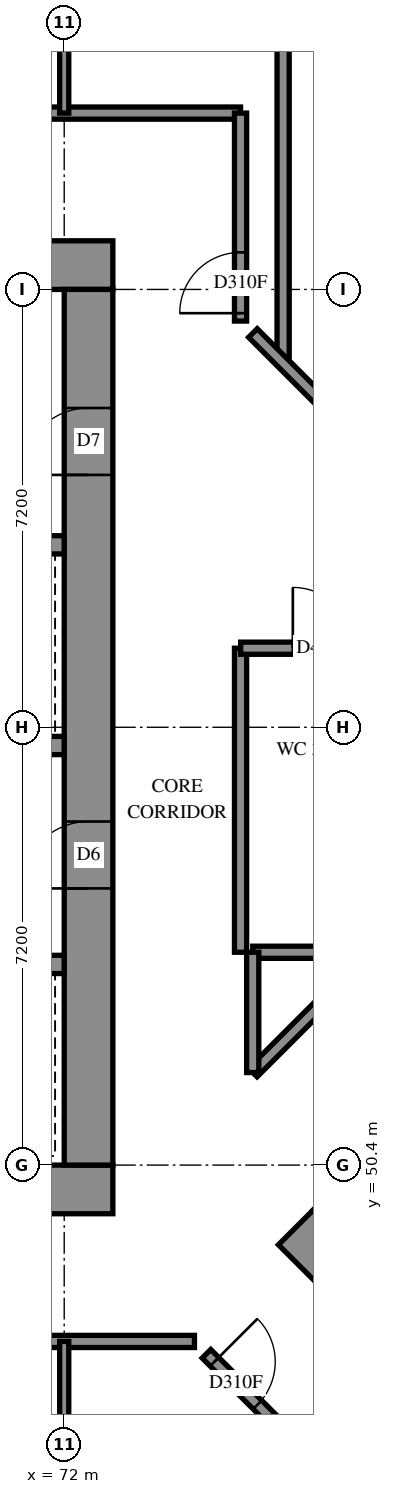
"""IFC4 building model, lengths in metres.
Left out: names, types, materials, properties, quantities, classifications, styles, units other than length and angle.
Written with IfcOpenShell. Run it as: python <this file> out.ifc"""

import sys

from ifc_helpers import new_model, si_unit, direction, frame, frame_2d, origin, place, context, subcontext, project, spatial, rectangle, extrude, element, fill, save


model = new_model("IFC4")
c1 = context("Model", 3, precision=1e-05, world=origin(), true_north=direction((0.0, 1.0)))
c2 = subcontext(c1, "Body", "Model", "MODEL_VIEW")
j1 = project(units=[si_unit("LENGTHUNIT", "METRE"), si_unit("PLANEANGLEUNIT", "RADIAN")], contexts=[c1])
p1 = place(None, origin())
s1 = spatial("IfcSite", under=j1, at=p1, CompositionType="ELEMENT")
p2 = place(p1, origin())
s2 = spatial("IfcBuilding", under=s1, at=p2, CompositionType="ELEMENT")
p3 = place(p2, frame((0.0, 0.0, 115.2)))
s3 = spatial("IfcBuildingStorey", under=s2, at=p3, CompositionType="ELEMENT", Elevation=115.2)
p4 = place(p3, frame((56.8, 50.0, -0.3), z_axis=(0.0, 0.0, 1.0), x_axis=(1.0, 0.0, 0.0)))
e1 = element("IfcWall", 1, at=p4, inside=s3, PredefinedType="SHEAR", context=c2, shape_type="SweptSolid", body=[
    extrude(rectangle(XDim=16.0, YDim=0.8, at=frame_2d((8.0, 0.0))), origin(), (0.0, 0.0, 1.0), 2.7),
])
p5 = place(p3, frame((56.8, 65.2, -0.3), z_axis=(0.0, 0.0, 1.0), x_axis=(1.0, 0.0, 0.0)))
e2 = element("IfcWall", 2, at=p5, inside=s3, PredefinedType="SHEAR", context=c2, shape_type="SweptSolid", body=[
    extrude(rectangle(XDim=16.0, YDim=0.8, at=frame_2d((8.0, 0.0))), origin(), (0.0, 0.0, 1.0), 2.7),
])
p6 = place(p5, frame((10.8, 0.0, 0.3)))
e3 = element("IfcOpeningElement", 3, at=p6, cuts=e2, PredefinedType="OPENING", context=c2, shape_type="SweptSolid", body=[
    extrude(rectangle(XDim=0.8, YDim=2.1, at=frame_2d((0.4, 1.05))), frame((0.0, 0.41, 0.0), z_axis=(0.0, -1.0, 0.0), x_axis=(1.0, 0.0, 0.0)), (0.0, 0.0, 1.0), 0.82),
])
p7 = place(p3, frame((72.4, 50.4, -0.3), z_axis=(0.0, 0.0, 1.0), x_axis=(0.0, 1.0, 0.0)))
e4 = element("IfcWall", 4, at=p7, inside=s3, PredefinedType="SHEAR", context=c2, shape_type="SweptSolid", body=[
    extrude(rectangle(XDim=14.4, YDim=0.8, at=frame_2d((7.2, 0.0))), origin(), (0.0, 0.0, 1.0), 2.7),
])
p8 = place(p7, frame((4.55, 0.0, 0.3)))
e5 = element("IfcOpeningElement", 5, at=p8, cuts=e4, PredefinedType="OPENING", context=c2, shape_type="SweptSolid", body=[
    extrude(rectangle(XDim=1.1, YDim=2.1, at=frame_2d((0.55, 1.05))), frame((0.0, 0.41, 0.0), z_axis=(0.0, -1.0, 0.0), x_axis=(1.0, 0.0, 0.0)), (0.0, 0.0, 1.0), 0.82),
])
p9 = place(p7, frame((11.35, 0.0, 0.3)))
e6 = element("IfcOpeningElement", 6, at=p9, cuts=e4, PredefinedType="OPENING", context=c2, shape_type="SweptSolid", body=[
    extrude(rectangle(XDim=1.1, YDim=2.1, at=frame_2d((0.55, 1.05))), frame((0.0, 0.41, 0.0), z_axis=(0.0, -1.0, 0.0), x_axis=(1.0, 0.0, 0.0)), (0.0, 0.0, 1.0), 0.82),
])
p10 = place(p3, frame((57.6, 53.7, 0.0), z_axis=(0.0, 0.0, 1.0), x_axis=(1.0, 0.0, 0.0)))
e7 = element("IfcWall", 7, at=p10, inside=s3, PredefinedType="SOLIDWALL", context=c2, shape_type="SweptSolid", body=[
    extrude(rectangle(XDim=14.4, YDim=0.3, at=frame_2d((7.2, 0.0))), origin(), (0.0, 0.0, 1.0), 3.1),
])
p11 = place(p10, frame((1.25, 0.0, 0.0)))
e8 = element("IfcOpeningElement", 8, at=p11, cuts=e7, PredefinedType="OPENING", context=c2, shape_type="SweptSolid", body=[
    extrude(rectangle(XDim=1.1, YDim=2.1, at=frame_2d((0.55, 1.05))), frame((0.0, 0.16, 0.0), z_axis=(0.0, -1.0, 0.0), x_axis=(1.0, 0.0, 0.0)), (0.0, 0.0, 1.0), 0.32),
])
p12 = place(p10, frame((4.85, 0.0, 0.0)))
e9 = element("IfcOpeningElement", 9, at=p12, cuts=e7, PredefinedType="OPENING", context=c2, shape_type="SweptSolid", body=[
    extrude(rectangle(XDim=1.1, YDim=2.1, at=frame_2d((0.55, 1.05))), frame((0.0, 0.16, 0.0), z_axis=(0.0, -1.0, 0.0), x_axis=(1.0, 0.0, 0.0)), (0.0, 0.0, 1.0), 0.32),
])
p13 = place(p10, frame((8.45, 0.0, 0.0)))
e10 = element("IfcOpeningElement", 10, at=p13, cuts=e7, PredefinedType="OPENING", context=c2, shape_type="SweptSolid", body=[
    extrude(rectangle(XDim=1.1, YDim=2.1, at=frame_2d((0.55, 1.05))), frame((0.0, 0.16, 0.0), z_axis=(0.0, -1.0, 0.0), x_axis=(1.0, 0.0, 0.0)), (0.0, 0.0, 1.0), 0.32),
])
p14 = place(p10, frame((12.05, 0.0, 0.0)))
e11 = element("IfcOpeningElement", 11, at=p14, cuts=e7, PredefinedType="OPENING", context=c2, shape_type="SweptSolid", body=[
    extrude(rectangle(XDim=1.1, YDim=2.1, at=frame_2d((0.55, 1.05))), frame((0.0, 0.16, 0.0), z_axis=(0.0, -1.0, 0.0), x_axis=(1.0, 0.0, 0.0)), (0.0, 0.0, 1.0), 0.32),
])
p15 = place(p3, frame((57.6, 57.3, 0.0), z_axis=(0.0, 0.0, 1.0), x_axis=(1.0, 0.0, 0.0)))
e12 = element("IfcWall", 12, at=p15, inside=s3, PredefinedType="SOLIDWALL", context=c2, shape_type="SweptSolid", body=[
    extrude(rectangle(XDim=14.4, YDim=0.3, at=frame_2d((7.2, 0.0))), origin(), (0.0, 0.0, 1.0), 3.1),
])
p16 = place(p15, frame((12.05, 0.0, 0.0)))
e13 = element("IfcOpeningElement", 13, at=p16, cuts=e12, PredefinedType="OPENING", context=c2, shape_type="SweptSolid", body=[
    extrude(rectangle(XDim=1.1, YDim=2.1, at=frame_2d((0.55, 1.05))), frame((0.0, 0.16, 0.0), z_axis=(0.0, -1.0, 0.0), x_axis=(1.0, 0.0, 0.0)), (0.0, 0.0, 1.0), 0.32),
])
p17 = place(p3, frame((64.8, 60.6, 0.0), z_axis=(0.0, 0.0, 1.0), x_axis=(1.0, 0.0, 0.0)))
e14 = element("IfcWall", 14, at=p17, inside=s3, PredefinedType="SOLIDWALL", context=c2, shape_type="SweptSolid", body=[
    extrude(rectangle(XDim=7.2, YDim=0.3, at=frame_2d((3.6, 0.0))), origin(), (0.0, 0.0, 1.0), 3.1),
])
p18 = place(p3, frame((75.806, 49.373, -0.3), z_axis=(0.0, 0.0, 1.0), x_axis=(0.7071067812, -0.7071067812, 0.0)))
e15 = element("IfcWall", 15, at=p18, inside=s3, PredefinedType="SHEAR", context=c2, shape_type="SweptSolid", body=[
    extrude(rectangle(XDim=16.0, YDim=0.8, at=frame_2d((8.0, 0.0))), origin(), (0.0, 0.0, 1.0), 2.7),
])
p19 = place(p3, frame((76.372, 49.373, -0.3), z_axis=(0.0, 0.0, 1.0), x_axis=(0.7071067812, 0.7071067812, 0.0)))
e16 = element("IfcWall", 16, at=p19, inside=s3, PredefinedType="SHEAR", context=c2, shape_type="SweptSolid", body=[
    extrude(rectangle(XDim=14.4, YDim=0.8, at=frame_2d((7.2, 0.0))), origin(), (0.0, 0.0, 1.0), 2.7),
])
p20 = place(p19, frame((4.55, 0.0, 0.3)))
e17 = element("IfcOpeningElement", 17, at=p20, cuts=e16, PredefinedType="OPENING", context=c2, shape_type="SweptSolid", body=[
    extrude(rectangle(XDim=1.1, YDim=2.1, at=frame_2d((0.55, 1.05))), frame((0.0, 0.41, 0.0), z_axis=(0.0, -1.0, 0.0), x_axis=(1.0, 0.0, 0.0)), (0.0, 0.0, 1.0), 0.82),
])
p21 = place(p19, frame((11.35, 0.0, 0.3)))
e18 = element("IfcOpeningElement", 18, at=p21, cuts=e16, PredefinedType="OPENING", context=c2, shape_type="SweptSolid", body=[
    extrude(rectangle(XDim=1.1, YDim=2.1, at=frame_2d((0.55, 1.05))), frame((0.0, 0.41, 0.0), z_axis=(0.0, -1.0, 0.0), x_axis=(1.0, 0.0, 0.0)), (0.0, 0.0, 1.0), 0.82),
])
p22 = place(p3, frame((54.7, 67.7, 0.0), z_axis=(0.0, 0.0, 1.0), x_axis=(1.0, 0.0, 0.0)))
e19 = element("IfcWall", 19, at=p22, inside=s3, PredefinedType="PARTITIONING", context=c2, shape_type="SweptSolid", body=[
    extrude(rectangle(XDim=20.2, YDim=0.2, at=frame_2d((10.1, 0.0))), origin(), (0.0, 0.0, 1.0), 3.1),
])
p23 = place(p22, frame((5.2, 0.0, 0.0)))
e20 = element("IfcOpeningElement", 20, at=p23, cuts=e19, PredefinedType="OPENING", context=c2, shape_type="SweptSolid", body=[
    extrude(rectangle(XDim=0.9, YDim=2.1, at=frame_2d((0.45, 1.05))), frame((0.0, 0.11, 0.0), z_axis=(0.0, -1.0, 0.0), x_axis=(1.0, 0.0, 0.0)), (0.0, 0.0, 1.0), 0.22),
])
p24 = place(p22, frame((8.838, 0.0, 0.0)))
e21 = element("IfcOpeningElement", 21, at=p24, cuts=e19, PredefinedType="OPENING", context=c2, shape_type="SweptSolid", body=[
    extrude(rectangle(XDim=1.0, YDim=2.1, at=frame_2d((0.5, 1.05))), frame((0.0, 0.11, 0.0), z_axis=(0.0, -1.0, 0.0), x_axis=(1.0, 0.0, 0.0)), (0.0, 0.0, 1.0), 0.22),
])
p25 = place(p22, frame((14.1, 0.0, 0.0)))
e22 = element("IfcOpeningElement", 22, at=p25, cuts=e19, PredefinedType="OPENING", context=c2, shape_type="SweptSolid", body=[
    extrude(rectangle(XDim=0.9, YDim=2.1, at=frame_2d((0.45, 1.05))), frame((0.0, 0.11, 0.0), z_axis=(0.0, -1.0, 0.0), x_axis=(1.0, 0.0, 0.0)), (0.0, 0.0, 1.0), 0.22),
])
p26 = place(p3, frame((54.7, 47.5, 0.0), z_axis=(0.0, 0.0, 1.0), x_axis=(1.0, 0.0, 0.0)))
e23 = element("IfcWall", 23, at=p26, inside=s3, PredefinedType="PARTITIONING", context=c2, shape_type="SweptSolid", body=[
    extrude(rectangle(XDim=19.442, YDim=0.2, at=frame_2d((9.721, 0.0))), origin(), (0.0, 0.0, 1.0), 3.1),
])
p27 = place(p26, frame((5.2, 0.0, 0.0)))
e24 = element("IfcOpeningElement", 24, at=p27, cuts=e23, PredefinedType="OPENING", context=c2, shape_type="SweptSolid", body=[
    extrude(rectangle(XDim=0.9, YDim=2.1, at=frame_2d((0.45, 1.05))), frame((0.0, 0.11, 0.0), z_axis=(0.0, -1.0, 0.0), x_axis=(1.0, 0.0, 0.0)), (0.0, 0.0, 1.0), 0.22),
])
p28 = place(p26, frame((8.757, 0.0, 0.0)))
e25 = element("IfcOpeningElement", 25, at=p28, cuts=e23, PredefinedType="OPENING", context=c2, shape_type="SweptSolid", body=[
    extrude(rectangle(XDim=0.9, YDim=2.1, at=frame_2d((0.45, 1.05))), frame((0.0, 0.11, 0.0), z_axis=(0.0, -1.0, 0.0), x_axis=(1.0, 0.0, 0.0)), (0.0, 0.0, 1.0), 0.22),
])
p29 = place(p26, frame((14.05, 0.0, 0.0)))
e26 = element("IfcOpeningElement", 26, at=p29, cuts=e23, PredefinedType="OPENING", context=c2, shape_type="SweptSolid", body=[
    extrude(rectangle(XDim=0.9, YDim=2.1, at=frame_2d((0.45, 1.05))), frame((0.0, 0.11, 0.0), z_axis=(0.0, -1.0, 0.0), x_axis=(1.0, 0.0, 0.0)), (0.0, 0.0, 1.0), 0.22),
])
p30 = place(p3, frame((75.6, 63.58, 0.0), z_axis=(0.0, 0.0, 1.0), x_axis=(0.0, 1.0, 0.0)))
e27 = element("IfcWall", 27, at=p30, inside=s3, PredefinedType="PARTITIONING", context=c2, shape_type="SweptSolid", body=[
    extrude(rectangle(XDim=9.187, YDim=0.2, at=frame_2d((4.593, 0.0))), origin(), (0.0, 0.0, 1.0), 3.1),
])
p31 = place(p3, frame((74.9, 53.9, 0.0), z_axis=(0.0, 0.0, 1.0), x_axis=(0.0, 1.0, 0.0)))
e28 = element("IfcWall", 28, at=p31, inside=s3, PredefinedType="PARTITIONING", context=c2, shape_type="SweptSolid", body=[
    extrude(rectangle(XDim=5.0, YDim=0.2, at=frame_2d((2.5, 0.0))), origin(), (0.0, 0.0, 1.0), 3.1),
])
p32 = place(p3, frame((75.103, 64.083, 0.0), z_axis=(0.0, 0.0, 1.0), x_axis=(0.7071067812, -0.7071067812, 0.0)))
e29 = element("IfcWall", 29, at=p32, inside=s3, PredefinedType="PARTITIONING", context=c2, shape_type="SweptSolid", body=[
    extrude(rectangle(XDim=4.214, YDim=0.2, at=frame_2d((2.107, 0.0))), origin(), (0.0, 0.0, 1.0), 3.1),
])
p33 = place(p32, frame((2.979, 0.0, 0.0)))
e30 = element("IfcOpeningElement", 30, at=p33, cuts=e29, PredefinedType="OPENING", context=c2, shape_type="SweptSolid", body=[
    extrude(rectangle(XDim=1.0, YDim=2.1, at=frame_2d((0.5, 1.05))), frame((0.0, 0.11, 0.0), z_axis=(0.0, -1.0, 0.0), x_axis=(1.0, 0.0, 0.0)), (0.0, 0.0, 1.0), 0.22),
])
p34 = place(p3, frame((74.9, 64.28, 0.0), z_axis=(0.0, 0.0, 1.0), x_axis=(0.0, 1.0, 0.0)))
e31 = element("IfcWall", 31, at=p34, inside=s3, PredefinedType="PARTITIONING", context=c2, shape_type="SweptSolid", body=[
    extrude(rectangle(XDim=3.42, YDim=0.2, at=frame_2d((1.71, 0.0))), origin(), (0.0, 0.0, 1.0), 3.1),
])
p35 = place(p34, frame((0.13, 0.0, 0.0)))
e32 = element("IfcOpeningElement", 32, at=p35, cuts=e31, PredefinedType="OPENING", context=c2, shape_type="SweptSolid", body=[
    extrude(rectangle(XDim=1.0, YDim=2.1, at=frame_2d((0.5, 1.05))), frame((0.0, 0.11, 0.0), z_axis=(0.0, -1.0, 0.0), x_axis=(1.0, 0.0, 0.0)), (0.0, 0.0, 1.0), 0.22),
])
p36 = place(p3, frame((75.102, 51.922, 0.0), z_axis=(0.0, 0.0, 1.0), x_axis=(0.7071067812, 0.7071067812, 0.0)))
e33 = element("IfcWall", 33, at=p36, inside=s3, PredefinedType="PARTITIONING", context=c2, shape_type="SweptSolid", body=[
    extrude(rectangle(XDim=2.797, YDim=0.2, at=frame_2d((1.399, 0.0))), origin(), (0.0, 0.0, 1.0), 3.1),
])
for number, where, z_axis, x_axis in (
    (34, (72.0, 45.1, 0.0), (0.0, 0.0, 1.0), (0.0, 1.0, 0.0)),
    (35, (72.0, 67.7, 0.0), (0.0, 0.0, 1.0), (0.0, 1.0, 0.0)),
):
    element("IfcWall", number, at=place(p3, frame(where, z_axis=z_axis, x_axis=x_axis)), inside=s3, PredefinedType="PARTITIONING", context=c2, shape_type="SweptSolid", body=[
        extrude(rectangle(XDim=2.4, YDim=0.15, at=frame_2d((1.2, 0.0))), origin(), (0.0, 0.0, 1.0), 3.1),
    ])
p37 = place(p3, frame((74.902, 58.9, 0.0), z_axis=(0.0, 0.0, 1.0), x_axis=(1.0, 0.0, 0.0)))
e36 = element("IfcWall", 36, at=p37, inside=s3, PredefinedType="PARTITIONING", context=c2, shape_type="SweptSolid", body=[
    extrude(rectangle(XDim=2.266, YDim=0.2, at=frame_2d((1.133, 0.0))), origin(), (0.0, 0.0, 1.0), 3.1),
])
p38 = place(p37, frame((0.858, 0.0, 0.0)))
e37 = element("IfcOpeningElement", 37, at=p38, cuts=e36, PredefinedType="OPENING", context=c2, shape_type="SweptSolid", body=[
    extrude(rectangle(XDim=1.0, YDim=2.1, at=frame_2d((0.5, 1.05))), frame((0.0, 0.11, 0.0), z_axis=(0.0, -1.0, 0.0), x_axis=(1.0, 0.0, 0.0)), (0.0, 0.0, 1.0), 0.22),
])
p39 = place(p3, frame((75.1, 53.9, 0.0), z_axis=(0.0, 0.0, 1.0), x_axis=(1.0, 0.0, 0.0)))
e38 = element("IfcWall", 38, at=p39, inside=s3, PredefinedType="PARTITIONING", context=c2, shape_type="SweptSolid", body=[
    extrude(rectangle(XDim=1.98, YDim=0.2, at=frame_2d((0.99, 0.0))), origin(), (0.0, 0.0, 1.0), 3.1),
])
p40 = place(p3, frame((75.1, 51.922, 0.0), z_axis=(0.0, 0.0, 1.0), x_axis=(0.0, 1.0, 0.0)))
e39 = element("IfcWall", 39, at=p40, inside=s3, PredefinedType="PARTITIONING", context=c2, shape_type="SweptSolid", body=[
    extrude(rectangle(XDim=1.978, YDim=0.2, at=frame_2d((0.989, 0.0))), origin(), (0.0, 0.0, 1.0), 3.1),
])
p41 = place(p3, frame((74.339, 47.297, 0.0), z_axis=(0.0, 0.0, 1.0), x_axis=(0.7071067812, -0.7071067812, 0.0)))
e40 = element("IfcWall", 40, at=p41, inside=s3, PredefinedType="PARTITIONING", context=c2, shape_type="SweptSolid", body=[
    extrude(rectangle(XDim=1.779, YDim=0.2, at=frame_2d((0.889, 0.0))), origin(), (0.0, 0.0, 1.0), 3.1),
])
p42 = place(p41, frame((0.186, 0.0, 0.0)))
e41 = element("IfcOpeningElement", 41, at=p42, cuts=e40, PredefinedType="OPENING", context=c2, shape_type="SweptSolid", body=[
    extrude(rectangle(XDim=1.0, YDim=2.1, at=frame_2d((0.5, 1.05))), frame((0.0, 0.11, 0.0), z_axis=(0.0, -1.0, 0.0), x_axis=(1.0, 0.0, 0.0)), (0.0, 0.0, 1.0), 0.22),
])
p43 = place(p8, origin())
e42 = element("IfcDoor", 42, at=p43, inside=s3, OperationType="DOUBLE_DOOR_SINGLE_SWING", PredefinedType="DOOR", context=c2, shape_type="SweptSolid", body=[
    extrude(rectangle(XDim=1.1, YDim=2.1, at=frame_2d((0.55, 1.05))), frame((0.0, 0.025, 0.0), z_axis=(0.0, -1.0, 0.0), x_axis=(1.0, 0.0, 0.0)), (0.0, 0.0, 1.0), 0.05),
])
fill(e5, e42)
p44 = place(p9, origin())
e43 = element("IfcDoor", 43, at=p44, inside=s3, OperationType="SINGLE_SWING_RIGHT", PredefinedType="DOOR", context=c2, shape_type="SweptSolid", body=[
    extrude(rectangle(XDim=1.1, YDim=2.1, at=frame_2d((0.55, 1.05))), frame((0.0, 0.025, 0.0), z_axis=(0.0, -1.0, 0.0), x_axis=(1.0, 0.0, 0.0)), (0.0, 0.0, 1.0), 0.05),
])
fill(e6, e43)
p45 = place(p38, origin())
e44 = element("IfcDoor", 44, at=p45, inside=s3, OperationType="SINGLE_SWING_RIGHT", PredefinedType="DOOR", context=c2, shape_type="SweptSolid", body=[
    extrude(rectangle(XDim=1.0, YDim=2.1, at=frame_2d((0.5, 1.05))), frame((0.0, 0.025, 0.0), z_axis=(0.0, -1.0, 0.0), x_axis=(1.0, 0.0, 0.0)), (0.0, 0.0, 1.0), 0.05),
])
fill(e37, e44)
p46 = place(p42, origin())
e45 = element("IfcDoor", 45, at=p46, inside=s3, OperationType="SINGLE_SWING_LEFT", PredefinedType="DOOR", context=c2, shape_type="SweptSolid", body=[
    extrude(rectangle(XDim=1.0, YDim=2.1, at=frame_2d((0.5, 1.05))), frame((0.0, 0.025, 0.0), z_axis=(0.0, -1.0, 0.0), x_axis=(1.0, 0.0, 0.0)), (0.0, 0.0, 1.0), 0.05),
])
fill(e41, e45)
p47 = place(p35, origin())
e46 = element("IfcDoor", 46, at=p47, inside=s3, OperationType="SINGLE_SWING_RIGHT", PredefinedType="DOOR", context=c2, shape_type="SweptSolid", body=[
    extrude(rectangle(XDim=1.0, YDim=2.1, at=frame_2d((0.5, 1.05))), frame((0.0, 0.025, 0.0), z_axis=(0.0, -1.0, 0.0), x_axis=(1.0, 0.0, 0.0)), (0.0, 0.0, 1.0), 0.05),
])
fill(e32, e46)
save(model, sys.argv[1])
